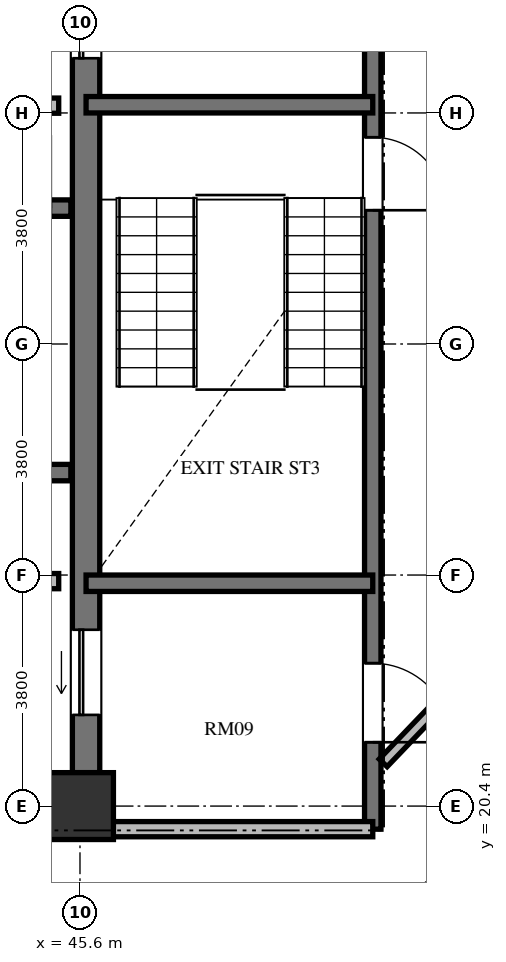
"""IFC4 building model, lengths in metres.
Left out: names, types, materials, properties, quantities, classifications, styles, units other than length and angle.
Written with IfcOpenShell. Run it as: python <this file> out.ifc"""

import sys

from ifc_helpers import new_model, si_unit, direction, frame, frame_2d, origin, origin_2d, place, context, subcontext, project, spatial, rectangle, extrude, element, fill, save


model = new_model("IFC4")
c1 = context("Model", 3, precision=1e-05, world=origin(), true_north=direction((0.0, 1.0)))
c2 = subcontext(c1, "Body", "Model", "MODEL_VIEW")
j1 = project(units=[si_unit("LENGTHUNIT", "METRE"), si_unit("PLANEANGLEUNIT", "RADIAN")], contexts=[c1])
p1 = place(None, origin())
s1 = spatial("IfcSite", under=j1, at=p1, CompositionType="ELEMENT")
p2 = place(p1, origin())
s2 = spatial("IfcBuilding", under=s1, at=p2, CompositionType="ELEMENT")
p3 = place(p2, frame((0.0, 0.0, 251.376)))
s3 = spatial("IfcBuildingStorey", under=s2, at=p3, CompositionType="ELEMENT", Elevation=251.376)
p4 = place(p3, frame((45.6, 20.4, 0.0), z_axis=(0.0, 0.0, 1.0), x_axis=(1.0, 0.0, 0.0)))
e1 = element("IfcColumn", 1, at=p4, inside=s3, PredefinedType="COLUMN", context=c2, shape_type="SweptSolid", body=[
    extrude(rectangle(XDim=1.1, YDim=1.1, at=origin_2d()), origin(), (0.0, 0.0, 1.0), 3.648),
])
p5 = place(p3, frame((45.7, 20.95, 0.0), z_axis=(0.0, 0.0, 1.0), x_axis=(0.0, 1.0, 0.0)))
e2 = element("IfcWall", 2, at=p5, inside=s3, PredefinedType="SHEAR", context=c2, shape_type="SweptSolid", body=[
    extrude(rectangle(XDim=14.1, YDim=0.45, at=frame_2d((7.05, 0.0))), origin(), (0.0, 0.0, 1.0), 3.648),
])
p6 = place(p5, frame((11.75, 0.0, 0.0)))
e3 = element("IfcOpeningElement", 3, at=p6, cuts=e2, PredefinedType="OPENING", context=c2, shape_type="SweptSolid", body=[
    extrude(rectangle(XDim=1.4, YDim=2.3, at=frame_2d((0.7, 1.15))), frame((0.0, 0.235, 0.0), z_axis=(0.0, -1.0, 0.0), x_axis=(1.0, 0.0, 0.0)), (0.0, 0.0, 1.0), 0.47),
])
p7 = place(p5, frame((0.95, 0.0, 0.0)))
e4 = element("IfcOpeningElement", 4, at=p7, cuts=e2, PredefinedType="OPENING", context=c2, shape_type="SweptSolid", body=[
    extrude(rectangle(XDim=1.4, YDim=2.3, at=frame_2d((0.7, 1.15))), frame((0.0, 0.235, 0.0), z_axis=(0.0, -1.0, 0.0), x_axis=(1.0, 0.0, 0.0)), (0.0, 0.0, 1.0), 0.47),
])
p8 = place(p3, frame((37.465, 30.235, 0.0), z_axis=(0.0, 0.0, 1.0), x_axis=(1.0, 0.0, 0.0)))
e5 = element("IfcWall", 5, at=p8, inside=s3, PredefinedType="SHEAR", context=c2, shape_type="SweptSolid", body=[
    extrude(rectangle(XDim=7.985, YDim=0.27, at=frame_2d((3.992, 0.0))), origin(), (0.0, 0.0, 1.0), 3.648),
])
p9 = place(p8, frame((6.455, 0.0, 0.0)))
e6 = element("IfcOpeningElement", 6, at=p9, cuts=e5, PredefinedType="OPENING", context=c2, shape_type="SweptSolid", body=[
    extrude(rectangle(XDim=1.2, YDim=2.15, at=frame_2d((0.6, 1.075))), frame((0.0, 0.145, 0.0), z_axis=(0.0, -1.0, 0.0), x_axis=(1.0, 0.0, 0.0)), (0.0, 0.0, 1.0), 0.29),
])
p10 = place(p3, frame((37.465, 25.885, 0.0), z_axis=(0.0, 0.0, 1.0), x_axis=(1.0, 0.0, 0.0)))
e7 = element("IfcWall", 7, at=p10, inside=s3, PredefinedType="SHEAR", context=c2, shape_type="SweptSolid", body=[
    extrude(rectangle(XDim=7.985, YDim=0.27, at=frame_2d((3.992, 0.0))), origin(), (0.0, 0.0, 1.0), 3.648),
])
for number, where, z_axis, x_axis in (
    (8, (42.95, 31.92, 0.0), (0.0, 0.0, 1.0), (1.0, 0.0, 0.0)),
    (9, (42.95, 24.1, 0.0), (0.0, 0.0, 1.0), (1.0, 0.0, 0.0)),
):
    element("IfcWall", number, at=place(p3, frame(where, z_axis=z_axis, x_axis=x_axis)), inside=s3, PredefinedType="SOLIDWALL", context=c2, shape_type="SweptSolid", body=[
        extrude(rectangle(XDim=2.3, YDim=0.25, at=frame_2d((1.15, 0.0))), origin(), (0.0, 0.0, 1.0), 3.448),
    ])
p11 = place(p3, frame((50.415, 35.845, 0.0), z_axis=(0.0, 0.0, 1.0), x_axis=(0.0, -1.0, 0.0)))
e10 = element("IfcWall", 10, at=p11, inside=s3, PredefinedType="SHEAR", context=c2, shape_type="SweptSolid", body=[
    extrude(rectangle(XDim=15.825, YDim=0.27, at=frame_2d((7.913, 0.0))), origin(), (0.0, 0.0, 1.0), 3.648),
])
p12 = place(p11, frame((4.445, 0.0, 0.0)))
e11 = element("IfcOpeningElement", 11, at=p12, cuts=e10, PredefinedType="OPENING", context=c2, shape_type="SweptSolid", body=[
    extrude(rectangle(XDim=1.2, YDim=2.15, at=frame_2d((0.6, 1.075))), frame((0.0, 0.145, 0.0), z_axis=(0.0, -1.0, 0.0), x_axis=(1.0, 0.0, 0.0)), (0.0, 0.0, 1.0), 0.29),
])
p13 = place(p11, frame((1.295, 0.0, 0.0)))
e12 = element("IfcOpeningElement", 12, at=p13, cuts=e10, PredefinedType="OPENING", context=c2, shape_type="SweptSolid", body=[
    extrude(rectangle(XDim=1.3, YDim=2.2, at=frame_2d((0.65, 1.1))), frame((0.0, 0.145, 0.0), z_axis=(0.0, -1.0, 0.0), x_axis=(1.0, 0.0, 0.0)), (0.0, 0.0, 1.0), 0.29),
])
p14 = place(p11, frame((13.095, 0.0, 0.0)))
e13 = element("IfcOpeningElement", 13, at=p14, cuts=e10, PredefinedType="OPENING", context=c2, shape_type="SweptSolid", body=[
    extrude(rectangle(XDim=1.3, YDim=2.2, at=frame_2d((0.65, 1.1))), frame((0.0, 0.145, 0.0), z_axis=(0.0, -1.0, 0.0), x_axis=(1.0, 0.0, 0.0)), (0.0, 0.0, 1.0), 0.29),
])
for number, where, z_axis, x_axis in (
    (14, (45.7, 31.935, 0.0), (0.0, 0.0, 1.0), (1.0, 0.0, 0.0)),
    (15, (45.7, 24.065, 0.0), (0.0, 0.0, 1.0), (1.0, 0.0, 0.0)),
):
    element("IfcWall", number, at=place(p3, frame(where, z_axis=z_axis, x_axis=x_axis)), inside=s3, PredefinedType="SHEAR", context=c2, shape_type="SweptSolid", body=[
        extrude(rectangle(XDim=4.715, YDim=0.27, at=frame_2d((2.357, 0.0))), origin(), (0.0, 0.0, 1.0), 3.648),
    ])
p15 = place(p3, frame((45.7, 20.02, 0.0), z_axis=(0.0, 0.0, 1.0), x_axis=(1.0, 0.0, 0.0)))
e16 = element("IfcWall", 16, at=p15, inside=s3, PredefinedType="SOLIDWALL", context=c2, shape_type="SweptSolid", body=[
    extrude(rectangle(XDim=4.715, YDim=0.25, at=frame_2d((2.357, 0.0))), origin(), (0.0, 0.0, 1.0), 3.448),
])
p16 = place(p3, frame((53.078, 23.714, 0.0), z_axis=(0.0, 0.0, 1.0), x_axis=(-0.691353379446, -0.722516785085, 0.0)))
e17 = element("IfcWall", 17, at=p16, inside=s3, PredefinedType="PARTITIONING", context=c2, shape_type="SweptSolid", body=[
    extrude(rectangle(XDim=3.604, YDim=0.18, at=frame_2d((1.802, 0.0))), origin(), (0.0, 0.0, 1.0), 3.448),
])
p17 = place(p6, origin())
e18 = element("IfcDoor", 18, at=p17, inside=s3, OperationType="SLIDING_TO_LEFT", PredefinedType="DOOR", context=c2, shape_type="SweptSolid", body=[
    extrude(rectangle(XDim=1.4, YDim=2.3, at=frame_2d((0.7, 1.15))), frame((0.0, 0.025, 0.0), z_axis=(0.0, -1.0, 0.0), x_axis=(1.0, 0.0, 0.0)), (0.0, 0.0, 1.0), 0.05),
])
fill(e3, e18)
p18 = place(p7, origin())
e19 = element("IfcDoor", 19, at=p18, inside=s3, OperationType="SLIDING_TO_LEFT", PredefinedType="DOOR", context=c2, shape_type="SweptSolid", body=[
    extrude(rectangle(XDim=1.4, YDim=2.3, at=frame_2d((0.7, 1.15))), frame((0.0, 0.025, 0.0), z_axis=(0.0, -1.0, 0.0), x_axis=(1.0, 0.0, 0.0)), (0.0, 0.0, 1.0), 0.05),
])
fill(e4, e19)
p19 = place(p12, origin())
e20 = element("IfcDoor", 20, at=p19, inside=s3, OperationType="SINGLE_SWING_RIGHT", PredefinedType="DOOR", context=c2, shape_type="SweptSolid", body=[
    extrude(rectangle(XDim=1.2, YDim=2.15, at=frame_2d((0.6, 1.075))), frame((0.0, 0.025, 0.0), z_axis=(0.0, -1.0, 0.0), x_axis=(1.0, 0.0, 0.0)), (0.0, 0.0, 1.0), 0.05),
])
fill(e11, e20)
p20 = place(p14, origin())
e21 = element("IfcDoor", 21, at=p20, inside=s3, OperationType="SINGLE_SWING_RIGHT", PredefinedType="DOOR", context=c2, shape_type="SweptSolid", body=[
    extrude(rectangle(XDim=1.3, YDim=2.2, at=frame_2d((0.65, 1.1))), frame((0.0, 0.025, 0.0), z_axis=(0.0, -1.0, 0.0), x_axis=(1.0, 0.0, 0.0)), (0.0, 0.0, 1.0), 0.05),
])
fill(e13, e21)
save(model, sys.argv[1])
